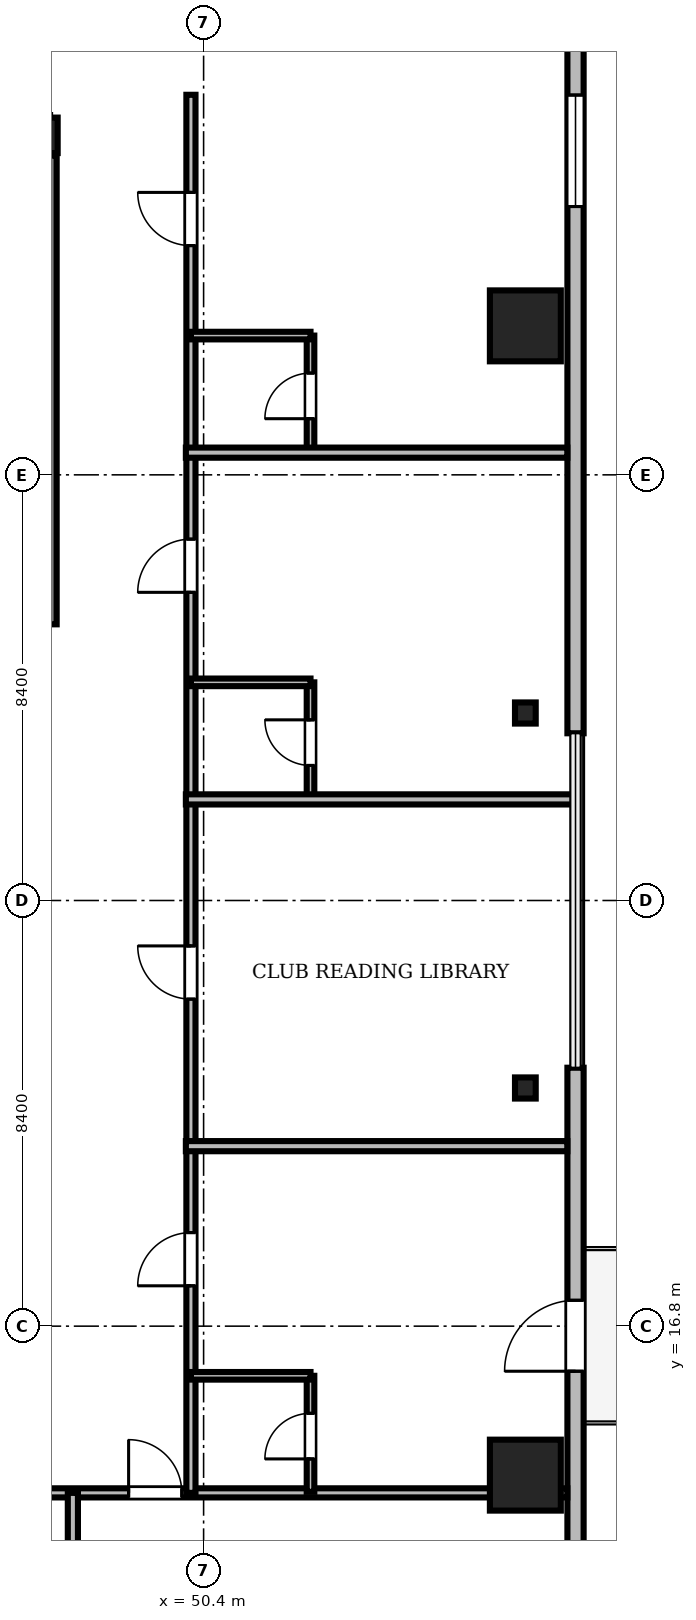
"""IFC4 building model, lengths in metres.
Left out: names, types, materials, properties, quantities, classifications, styles, units other than length and angle.
Written with IfcOpenShell. Run it as: python <this file> out.ifc"""

import sys

from ifc_helpers import new_model, si_unit, direction, frame, frame_2d, origin, origin_2d, place, context, subcontext, project, spatial, rectangle, i_section, extrude, source, transform, mapped, element, fill, save


model = new_model("IFC4")
c1 = context("Model", 3, precision=1e-05, world=origin(), true_north=direction((0.0, 1.0)))
c2 = subcontext(c1, "Body", "Model", "MODEL_VIEW")
j1 = project(units=[si_unit("LENGTHUNIT", "METRE"), si_unit("PLANEANGLEUNIT", "RADIAN")], contexts=[c1])
p1 = place(None, origin())
s1 = spatial("IfcSite", under=j1, at=p1, CompositionType="ELEMENT")
p2 = place(p1, origin())
s2 = spatial("IfcBuilding", under=s1, at=p2, CompositionType="ELEMENT")
p3 = place(p2, frame((0.0, 0.0, 184.8)))
s3 = spatial("IfcBuildingStorey", under=s2, at=p3, CompositionType="ELEMENT", Elevation=184.8)
m1 = source(origin(), c2, "Body", "SweptSolid", [
    extrude(i_section(OverallWidth=0.3, OverallDepth=0.7, WebThickness=0.017, FlangeThickness=0.032, FilletRadius=0.027, at=origin_2d()), origin(), (0.0, 0.0, 1.0), 3.53),
])
p4 = place(p3, frame((47.37, 40.3, 0.0), z_axis=(0.0, 0.0, 1.0), x_axis=(1.0, 0.0, 0.0)))
e1 = element("IfcColumn", 1, at=p4, inside=s3, PredefinedType="COLUMN", context=c2, shape_type="MappedRepresentation", body=[
    mapped(m1, transform((0.0, 0.0, 0.0), scale=1.0)),
])
m2 = source(origin(), c2, "Body", "SweptSolid", [
    extrude(rectangle(XDim=1.4, YDim=1.4, at=origin_2d()), origin(), (0.0, 0.0, 1.0), 3.53),
])
for number, where, z_axis, x_axis in (
    (2, (56.75, 13.86, 0.0), (0.0, 0.0, 1.0), (1.0, 0.0, 0.0)),
    (3, (56.75, 36.54, 0.0), (0.0, 0.0, 1.0), (1.0, 0.0, 0.0)),
):
    element("IfcColumn", number, at=place(p3, frame(where, z_axis=z_axis, x_axis=x_axis)), inside=s3, PredefinedType="COLUMN", context=c2, shape_type="MappedRepresentation", body=[
        mapped(m2, transform((0.0, 0.0, 0.0), scale=1.0)),
    ])
m3 = source(origin(), c2, "Body", "SweptSolid", [
    extrude(i_section(OverallWidth=0.409, OverallDepth=0.417, WebThickness=0.021, FlangeThickness=0.033, FilletRadius=0.015, at=origin_2d()), origin(), (0.0, 0.0, 1.0), 3.53),
])
for number, where, z_axis, x_axis in (
    (4, (56.75, 21.5, 0.0), (0.0, 0.0, 1.0), (1.0, 0.0, 0.0)),
    (5, (56.75, 28.9, 0.0), (0.0, 0.0, 1.0), (1.0, 0.0, 0.0)),
):
    element("IfcColumn", number, at=place(p3, frame(where, z_axis=z_axis, x_axis=x_axis)), inside=s3, PredefinedType="COLUMN", context=c2, shape_type="MappedRepresentation", body=[
        mapped(m3, transform((0.0, 0.0, 0.0), scale=1.0)),
    ])
m4 = source(origin(), c2, "Body", "SweptSolid", [
    extrude(rectangle(XDim=15.6, YDim=0.32, at=frame_2d((7.8, 0.0))), origin(), (0.0, 0.0, 1.0), 3.53),
])
p5 = place(p3, frame((57.74, 6.3, 0.0), z_axis=(0.0, 0.0, 1.0), x_axis=(0.0, 1.0, 0.0)))
e6 = element("IfcWall", 6, at=p5, inside=s3, PredefinedType="SOLIDWALL", context=c2, shape_type="MappedRepresentation", body=[
    mapped(m4, transform((0.0, 0.0, 0.0), scale=1.0)),
])
m5 = source(origin(), c2, "Body", "SweptSolid", [
    extrude(rectangle(XDim=1.4, YDim=2.3, at=frame_2d((0.7, 1.15))), frame((0.0, 0.17, 0.0), z_axis=(0.0, -1.0, 0.0), x_axis=(1.0, 0.0, 0.0)), (0.0, 0.0, 1.0), 0.34),
])
p6 = place(p5, frame((9.61, 0.0, 0.0)))
e7 = element("IfcOpeningElement", 7, at=p6, cuts=e6, PredefinedType="OPENING", context=c2, shape_type="MappedRepresentation", body=[
    mapped(m5, transform((0.0, 0.0, 0.0), scale=1.0)),
])
m6 = source(origin(), c2, "Body", "SweptSolid", [
    extrude(rectangle(XDim=2.2, YDim=2.4, at=frame_2d((1.1, 1.2))), frame((0.0, 0.17, 0.0), z_axis=(0.0, -1.0, 0.0), x_axis=(1.0, 0.0, 0.0)), (0.0, 0.0, 1.0), 0.34),
])
p7 = place(p5, frame((3.005, 0.0, 0.72)))
e8 = element("IfcOpeningElement", 8, at=p7, cuts=e6, PredefinedType="OPENING", context=c2, shape_type="MappedRepresentation", body=[
    mapped(m6, transform((0.0, 0.0, 0.0), scale=1.0)),
])
m7 = source(origin(), c2, "Body", "SweptSolid", [
    extrude(rectangle(XDim=15.6, YDim=0.32, at=frame_2d((7.8, 0.0))), origin(), (0.0, 0.0, 1.0), 3.53),
])
p8 = place(p3, frame((57.74, 28.5, 0.0), z_axis=(0.0, 0.0, 1.0), x_axis=(0.0, 1.0, 0.0)))
e9 = element("IfcWall", 9, at=p8, inside=s3, PredefinedType="SOLIDWALL", context=c2, shape_type="MappedRepresentation", body=[
    mapped(m7, transform((0.0, 0.0, 0.0), scale=1.0)),
])
p9 = place(p8, frame((10.395, 0.0, 0.72)))
e10 = element("IfcOpeningElement", 10, at=p9, cuts=e9, PredefinedType="OPENING", context=c2, shape_type="MappedRepresentation", body=[
    mapped(m6, transform((0.0, 0.0, 0.0), scale=1.0)),
])
m8 = source(origin(), c2, "Body", "SweptSolid", [
    extrude(rectangle(XDim=9.25, YDim=0.25, at=frame_2d((4.625, 0.0))), origin(), (0.0, 0.0, 1.0), 3.55),
])
p10 = place(p3, frame((47.375, 30.65, 0.0), z_axis=(0.0, 0.0, 1.0), x_axis=(0.0, 1.0, 0.0)))
e11 = element("IfcWall", 11, at=p10, inside=s3, PredefinedType="SOLIDWALL", context=c2, shape_type="MappedRepresentation", body=[
    mapped(m8, transform((0.0, 0.0, 0.0), scale=1.0)),
])
m9 = source(origin(), c2, "Body", "SweptSolid", [
    extrude(rectangle(XDim=46.156, YDim=0.18, at=frame_2d((23.078, 0.0))), origin(), (0.0, 0.0, 1.0), 2.772),
])
p11 = place(p3, frame((11.422, 13.51, 0.0), z_axis=(0.0, 0.0, 1.0), x_axis=(1.0, 0.0, 0.0)))
e12 = element("IfcWall", 12, at=p11, inside=s3, PredefinedType="PARTITIONING", context=c2, shape_type="MappedRepresentation", body=[
    mapped(m9, transform((0.0, 0.0, 0.0), scale=1.0)),
])
m10 = source(origin(), c2, "Body", "SweptSolid", [
    extrude(rectangle(XDim=1.05, YDim=2.2, at=frame_2d((0.525, 1.1))), frame((0.0, 0.1, 0.0), z_axis=(0.0, -1.0, 0.0), x_axis=(1.0, 0.0, 0.0)), (0.0, 0.0, 1.0), 0.2),
])
p12 = place(p11, frame((9.758, 0.0, 0.0)))
e13 = element("IfcOpeningElement", 13, at=p12, cuts=e12, PredefinedType="OPENING", context=c2, shape_type="MappedRepresentation", body=[
    mapped(m10, transform((0.0, 0.0, 0.0), scale=1.0)),
])
p13 = place(p11, frame((12.878, 0.0, 0.0)))
e14 = element("IfcOpeningElement", 14, at=p13, cuts=e12, PredefinedType="OPENING", context=c2, shape_type="MappedRepresentation", body=[
    mapped(m10, transform((0.0, 0.0, 0.0), scale=1.0)),
])
p14 = place(p11, frame((16.893, 0.0, 0.0)))
e15 = element("IfcOpeningElement", 15, at=p14, cuts=e12, PredefinedType="OPENING", context=c2, shape_type="MappedRepresentation", body=[
    mapped(m10, transform((0.0, 0.0, 0.0), scale=1.0)),
])
p15 = place(p11, frame((20.344, 0.0, 0.0)))
e16 = element("IfcOpeningElement", 16, at=p15, cuts=e12, PredefinedType="OPENING", context=c2, shape_type="MappedRepresentation", body=[
    mapped(m10, transform((0.0, 0.0, 0.0), scale=1.0)),
])
p16 = place(p11, frame((24.008, 0.0, 0.0)))
e17 = element("IfcOpeningElement", 17, at=p16, cuts=e12, PredefinedType="OPENING", context=c2, shape_type="MappedRepresentation", body=[
    mapped(m10, transform((0.0, 0.0, 0.0), scale=1.0)),
])
p17 = place(p11, frame((28.055, 0.0, 0.0)))
e18 = element("IfcOpeningElement", 18, at=p17, cuts=e12, PredefinedType="OPENING", context=c2, shape_type="MappedRepresentation", body=[
    mapped(m10, transform((0.0, 0.0, 0.0), scale=1.0)),
])
m11 = source(origin(), c2, "Body", "SweptSolid", [
    extrude(rectangle(XDim=0.95, YDim=2.15, at=frame_2d((0.475, 1.075))), frame((0.0, 0.1, 0.0), z_axis=(0.0, -1.0, 0.0), x_axis=(1.0, 0.0, 0.0)), (0.0, 0.0, 1.0), 0.2),
])
p18 = place(p11, frame((34.246, 0.0, 0.0)))
e19 = element("IfcOpeningElement", 19, at=p18, cuts=e12, PredefinedType="OPENING", context=c2, shape_type="MappedRepresentation", body=[
    mapped(m11, transform((0.0, 0.0, 0.0), scale=1.0)),
])
p19 = place(p11, frame((37.498, 0.0, 0.0)))
e20 = element("IfcOpeningElement", 20, at=p19, cuts=e12, PredefinedType="OPENING", context=c2, shape_type="MappedRepresentation", body=[
    mapped(m10, transform((0.0, 0.0, 0.0), scale=1.0)),
])
m12 = source(origin(), c2, "Body", "SweptSolid", [
    extrude(rectangle(XDim=27.59, YDim=0.18, at=frame_2d((13.795, 0.0))), origin(), (0.0, 0.0, 1.0), 2.972),
])
p20 = place(p3, frame((50.15, 13.51, 0.0), z_axis=(0.0, 0.0, 1.0), x_axis=(0.0, 1.0, 0.0)))
e21 = element("IfcWall", 21, at=p20, inside=s3, PredefinedType="PARTITIONING", context=c2, shape_type="MappedRepresentation", body=[
    mapped(m12, transform((0.0, 0.0, 0.0), scale=1.0)),
])
p21 = place(p20, frame((4.086, 0.0, 0.0)))
e22 = element("IfcOpeningElement", 22, at=p21, cuts=e21, PredefinedType="OPENING", context=c2, shape_type="MappedRepresentation", body=[
    mapped(m10, transform((0.0, 0.0, 0.0), scale=1.0)),
])
p22 = place(p20, frame((9.744, 0.0, 0.0)))
e23 = element("IfcOpeningElement", 23, at=p22, cuts=e21, PredefinedType="OPENING", context=c2, shape_type="MappedRepresentation", body=[
    mapped(m10, transform((0.0, 0.0, 0.0), scale=1.0)),
])
p23 = place(p20, frame((17.771, 0.0, 0.0)))
e24 = element("IfcOpeningElement", 24, at=p23, cuts=e21, PredefinedType="OPENING", context=c2, shape_type="MappedRepresentation", body=[
    mapped(m10, transform((0.0, 0.0, 0.0), scale=1.0)),
])
p24 = place(p20, frame((24.614, 0.0, 0.0)))
e25 = element("IfcOpeningElement", 25, at=p24, cuts=e21, PredefinedType="OPENING", context=c2, shape_type="MappedRepresentation", body=[
    mapped(m10, transform((0.0, 0.0, 0.0), scale=1.0)),
])
m13 = source(origin(), c2, "Body", "SweptSolid", [
    extrude(rectangle(XDim=2.29, YDim=0.15, at=frame_2d((1.145, 0.0))), origin(), (0.0, 0.0, 1.0), 2.972),
])
p25 = place(p3, frame((52.51, 13.53, 0.0), z_axis=(0.0, 0.0, 1.0), x_axis=(0.0, 1.0, 0.0)))
e26 = element("IfcWall", 26, at=p25, inside=s3, PredefinedType="PARTITIONING", context=c2, shape_type="MappedRepresentation", body=[
    mapped(m13, transform((0.0, 0.0, 0.0), scale=1.0)),
])
m14 = source(origin(), c2, "Body", "SweptSolid", [
    extrude(rectangle(XDim=0.9, YDim=2.1, at=frame_2d((0.45, 1.05))), frame((0.0, 0.085, 0.0), z_axis=(0.0, -1.0, 0.0), x_axis=(1.0, 0.0, 0.0)), (0.0, 0.0, 1.0), 0.17),
])
p26 = place(p25, frame((0.65, 0.0, 0.0)))
e27 = element("IfcOpeningElement", 27, at=p26, cuts=e26, PredefinedType="OPENING", context=c2, shape_type="MappedRepresentation", body=[
    mapped(m14, transform((0.0, 0.0, 0.0), scale=1.0)),
])
m15 = source(origin(), c2, "Body", "SweptSolid", [
    extrude(rectangle(XDim=2.29, YDim=0.15, at=frame_2d((1.145, 0.0))), origin(), (0.0, 0.0, 1.0), 2.972),
])
p27 = place(p3, frame((52.51, 27.215, 0.0), z_axis=(0.0, 0.0, 1.0), x_axis=(0.0, 1.0, 0.0)))
e28 = element("IfcWall", 28, at=p27, inside=s3, PredefinedType="PARTITIONING", context=c2, shape_type="MappedRepresentation", body=[
    mapped(m15, transform((0.0, 0.0, 0.0), scale=1.0)),
])
p28 = place(p27, frame((0.65, 0.0, 0.0)))
e29 = element("IfcOpeningElement", 29, at=p28, cuts=e28, PredefinedType="OPENING", context=c2, shape_type="MappedRepresentation", body=[
    mapped(m14, transform((0.0, 0.0, 0.0), scale=1.0)),
])
m16 = source(origin(), c2, "Body", "SweptSolid", [
    extrude(rectangle(XDim=2.29, YDim=0.15, at=frame_2d((1.145, 0.0))), origin(), (0.0, 0.0, 1.0), 3.53),
])
p29 = place(p3, frame((52.51, 34.058, 0.0), z_axis=(0.0, 0.0, 1.0), x_axis=(0.0, 1.0, 0.0)))
e30 = element("IfcWall", 30, at=p29, inside=s3, PredefinedType="PARTITIONING", context=c2, shape_type="MappedRepresentation", body=[
    mapped(m16, transform((0.0, 0.0, 0.0), scale=1.0)),
])
p30 = place(p29, frame((0.65, 0.0, 0.0)))
e31 = element("IfcOpeningElement", 31, at=p30, cuts=e30, PredefinedType="OPENING", context=c2, shape_type="MappedRepresentation", body=[
    mapped(m14, transform((0.0, 0.0, 0.0), scale=1.0)),
])
m17 = source(origin(), c2, "Body", "SweptSolid", [
    extrude(rectangle(XDim=11.388, YDim=0.2, at=frame_2d((5.694, 0.0))), origin(), (0.0, 0.0, 1.0), 2.772),
])
p31 = place(p3, frame((47.82, 2.122, 0.0), z_axis=(0.0, 0.0, 1.0), x_axis=(0.0, 1.0, 0.0)))
e32 = element("IfcWall", 32, at=p31, inside=s3, PredefinedType="PARTITIONING", context=c2, shape_type="MappedRepresentation", body=[
    mapped(m17, transform((0.0, 0.0, 0.0), scale=1.0)),
])
m18 = source(origin(), c2, "Body", "SweptSolid", [
    extrude(rectangle(XDim=7.528, YDim=0.2, at=frame_2d((3.764, 0.0))), origin(), (0.0, 0.0, 1.0), 2.772),
])
p32 = place(p3, frame((50.05, 20.352, 0.0), z_axis=(0.0, 0.0, 1.0), x_axis=(1.0, 0.0, 0.0)))
e33 = element("IfcWall", 33, at=p32, inside=s3, PredefinedType="PARTITIONING", context=c2, shape_type="MappedRepresentation", body=[
    mapped(m18, transform((0.0, 0.0, 0.0), scale=1.0)),
])
m19 = source(origin(), c2, "Body", "SweptSolid", [
    extrude(rectangle(XDim=7.72, YDim=0.2, at=frame_2d((3.86, 0.0))), origin(), (0.0, 0.0, 1.0), 2.772),
])
p33 = place(p3, frame((50.05, 27.195, 0.0), z_axis=(0.0, 0.0, 1.0), x_axis=(1.0, 0.0, 0.0)))
e34 = element("IfcWall", 34, at=p33, inside=s3, PredefinedType="PARTITIONING", context=c2, shape_type="MappedRepresentation", body=[
    mapped(m19, transform((0.0, 0.0, 0.0), scale=1.0)),
])
p34 = place(p3, frame((50.05, 34.038, 0.0), z_axis=(0.0, 0.0, 1.0), x_axis=(1.0, 0.0, 0.0)))
e35 = element("IfcWall", 35, at=p34, inside=s3, PredefinedType="PARTITIONING", context=c2, shape_type="MappedRepresentation", body=[
    mapped(m18, transform((0.0, 0.0, 0.0), scale=1.0)),
])
m20 = source(origin(), c2, "Body", "SweptSolid", [
    extrude(rectangle(XDim=2.36, YDim=0.15, at=frame_2d((1.18, 0.0))), origin(), (0.0, 0.0, 1.0), 3.53),
])
for number, where, z_axis, x_axis in (
    (36, (50.15, 15.82, 0.0), (0.0, 0.0, 1.0), (1.0, 0.0, 0.0)),
    (37, (50.15, 29.505, 0.0), (0.0, 0.0, 1.0), (1.0, 0.0, 0.0)),
    (38, (50.15, 36.348, 0.0), (0.0, 0.0, 1.0), (1.0, 0.0, 0.0)),
):
    element("IfcWall", number, at=place(p3, frame(where, z_axis=z_axis, x_axis=x_axis)), inside=s3, PredefinedType="PARTITIONING", context=c2, shape_type="MappedRepresentation", body=[
        mapped(m20, transform((0.0, 0.0, 0.0), scale=1.0)),
    ])
m21 = source(origin(), c2, "Body", "SweptSolid", [
    extrude(rectangle(XDim=1.4, YDim=2.3, at=frame_2d((0.7, 1.15))), frame((0.0, 0.025, 0.0), z_axis=(0.0, -1.0, 0.0), x_axis=(1.0, 0.0, 0.0)), (0.0, 0.0, 1.0), 0.05),
])
p35 = place(p6, frame((1.4, 0.0, 0.0), z_axis=(0.0, 0.0, 1.0), x_axis=(-1.0, 0.0, 0.0)))
e39 = element("IfcDoor", 39, at=p35, inside=s3, OperationType="DOUBLE_DOOR_SLIDING", PredefinedType="DOOR", context=c2, shape_type="MappedRepresentation", body=[
    mapped(m21, transform((0.0, 0.0, 0.0), scale=1.0)),
])
fill(e7, e39)
m22 = source(origin(), c2, "Body", "SweptSolid", [
    extrude(rectangle(XDim=2.2, YDim=2.4, at=frame_2d((1.1, 1.2))), frame((0.0, 0.03, 0.0), z_axis=(0.0, -1.0, 0.0), x_axis=(1.0, 0.0, 0.0)), (0.0, 0.0, 1.0), 0.06),
])
p36 = place(p9, origin())
e40 = element("IfcWindow", 40, at=p36, inside=s3, PartitioningType="SINGLE_PANEL", PredefinedType="WINDOW", context=c2, shape_type="MappedRepresentation", body=[
    mapped(m22, transform((0.0, 0.0, 0.0), scale=1.0)),
])
fill(e10, e40)
m23 = source(origin(), c2, "Body", "SweptSolid", [
    extrude(rectangle(XDim=1.05, YDim=2.2, at=frame_2d((0.525, 1.1))), frame((0.0, 0.025, 0.0), z_axis=(0.0, -1.0, 0.0), x_axis=(1.0, 0.0, 0.0)), (0.0, 0.0, 1.0), 0.05),
])
p37 = place(p19, origin())
e41 = element("IfcDoor", 41, at=p37, inside=s3, OperationType="SINGLE_SWING_LEFT", PredefinedType="DOOR", context=c2, shape_type="MappedRepresentation", body=[
    mapped(m23, transform((0.0, 0.0, 0.0), scale=1.0)),
])
fill(e20, e41)
p38 = place(p21, origin())
e42 = element("IfcDoor", 42, at=p38, inside=s3, OperationType="SINGLE_SWING_LEFT", PredefinedType="DOOR", context=c2, shape_type="MappedRepresentation", body=[
    mapped(m23, transform((0.0, 0.0, 0.0), scale=1.0)),
])
fill(e22, e42)
p39 = place(p22, origin())
e43 = element("IfcDoor", 43, at=p39, inside=s3, OperationType="SINGLE_SWING_RIGHT", PredefinedType="DOOR", context=c2, shape_type="MappedRepresentation", body=[
    mapped(m23, transform((0.0, 0.0, 0.0), scale=1.0)),
])
fill(e23, e43)
p40 = place(p23, origin())
e44 = element("IfcDoor", 44, at=p40, inside=s3, OperationType="SINGLE_SWING_LEFT", PredefinedType="DOOR", context=c2, shape_type="MappedRepresentation", body=[
    mapped(m23, transform((0.0, 0.0, 0.0), scale=1.0)),
])
fill(e24, e44)
p41 = place(p24, origin())
e45 = element("IfcDoor", 45, at=p41, inside=s3, OperationType="SINGLE_SWING_RIGHT", PredefinedType="DOOR", context=c2, shape_type="MappedRepresentation", body=[
    mapped(m23, transform((0.0, 0.0, 0.0), scale=1.0)),
])
fill(e25, e45)
m24 = source(origin(), c2, "Body", "SweptSolid", [
    extrude(rectangle(XDim=0.9, YDim=2.1, at=frame_2d((0.45, 1.05))), frame((0.0, 0.025, 0.0), z_axis=(0.0, -1.0, 0.0), x_axis=(1.0, 0.0, 0.0)), (0.0, 0.0, 1.0), 0.05),
])
p42 = place(p26, origin())
e46 = element("IfcDoor", 46, at=p42, inside=s3, OperationType="SINGLE_SWING_LEFT", PredefinedType="DOOR", context=c2, shape_type="MappedRepresentation", body=[
    mapped(m24, transform((0.0, 0.0, 0.0), scale=1.0)),
])
fill(e27, e46)
p43 = place(p28, origin())
e47 = element("IfcDoor", 47, at=p43, inside=s3, OperationType="SINGLE_SWING_RIGHT", PredefinedType="DOOR", context=c2, shape_type="MappedRepresentation", body=[
    mapped(m24, transform((0.0, 0.0, 0.0), scale=1.0)),
])
fill(e29, e47)
p44 = place(p30, origin())
e48 = element("IfcDoor", 48, at=p44, inside=s3, OperationType="SINGLE_SWING_LEFT", PredefinedType="DOOR", context=c2, shape_type="MappedRepresentation", body=[
    mapped(m24, transform((0.0, 0.0, 0.0), scale=1.0)),
])
fill(e31, e48)
save(model, sys.argv[1])
